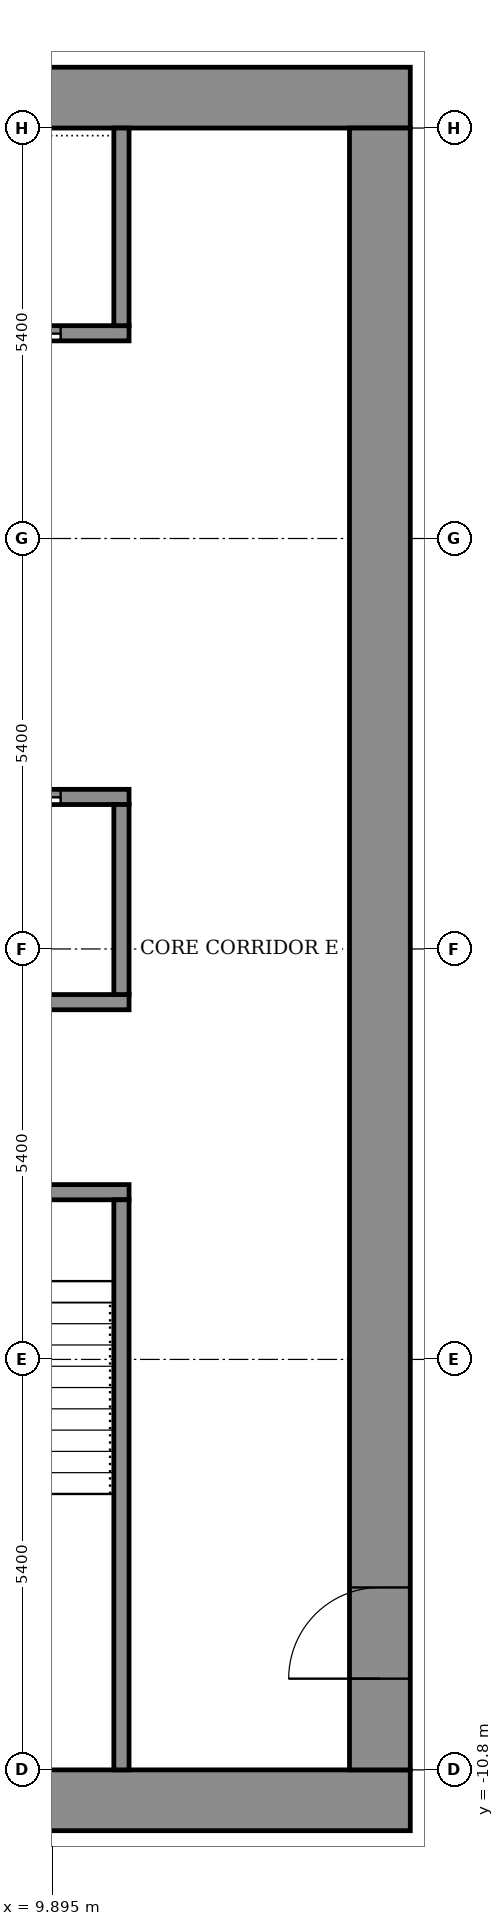
"""IFC4 building model, lengths in metres.
Left out: names, types, materials, properties, quantities, classifications, styles, units other than length and angle.
Written with IfcOpenShell. Run it as: python <this file> out.ifc"""

import sys

from ifc_helpers import new_model, si_unit, direction, frame, frame_2d, origin, place, context, subcontext, project, spatial, rectangle, extrude, element, fill, save


model = new_model("IFC4")
c1 = context("Model", 3, precision=1e-05, world=origin(), true_north=direction((0.0, 1.0)))
c2 = subcontext(c1, "Body", "Model", "MODEL_VIEW")
j1 = project(units=[si_unit("LENGTHUNIT", "METRE"), si_unit("PLANEANGLEUNIT", "RADIAN")], contexts=[c1])
p1 = place(None, origin())
s1 = spatial("IfcSite", under=j1, at=p1, CompositionType="ELEMENT")
p2 = place(p1, origin())
s2 = spatial("IfcBuilding", under=s1, at=p2, CompositionType="ELEMENT")
p3 = place(p2, frame((0.0, 0.0, 197.9)))
s3 = spatial("IfcBuildingStorey", under=s2, at=p3, CompositionType="ELEMENT", Elevation=197.9)
for number, where, z_axis, x_axis in (
    (1, (-14.6, -11.2, 0.0), (0.0, 0.0, 1.0), (1.0, 0.0, 0.0)),
    (2, (-14.6, 11.2, 0.0), (0.0, 0.0, 1.0), (1.0, 0.0, 0.0)),
):
    element("IfcWall", number, at=place(p3, frame(where, z_axis=z_axis, x_axis=x_axis)), inside=s3, PredefinedType="SHEAR", context=c2, shape_type="SweptSolid", body=[
        extrude(rectangle(XDim=29.2, YDim=0.8, at=frame_2d((14.6, 0.0))), origin(), (0.0, 0.0, 1.0), 3.6),
    ])
p4 = place(p3, frame((14.2, -10.8, 0.0), z_axis=(0.0, 0.0, 1.0), x_axis=(0.0, 1.0, 0.0)))
e3 = element("IfcWall", 3, at=p4, inside=s3, PredefinedType="SHEAR", context=c2, shape_type="SweptSolid", body=[
    extrude(rectangle(XDim=21.6, YDim=0.8, at=frame_2d((10.8, 0.0))), origin(), (0.0, 0.0, 1.0), 3.6),
])
p5 = place(p4, frame((1.2, 0.0, 0.0)))
e4 = element("IfcOpeningElement", 4, at=p5, cuts=e3, PredefinedType="OPENING", context=c2, shape_type="SweptSolid", body=[
    extrude(rectangle(XDim=1.2, YDim=2.1, at=frame_2d((0.6, 1.05))), frame((0.0, 0.41, 0.0), z_axis=(0.0, -1.0, 0.0), x_axis=(1.0, 0.0, 0.0)), (0.0, 0.0, 1.0), 0.82),
])
p6 = place(p3, frame((-10.9, -3.2, 0.0), z_axis=(0.0, 0.0, 1.0), x_axis=(1.0, 0.0, 0.0)))
e5 = element("IfcWall", 5, at=p6, inside=s3, PredefinedType="SHEAR", context=c2, shape_type="SweptSolid", body=[
    extrude(rectangle(XDim=21.8, YDim=0.2, at=frame_2d((10.9, 0.0))), origin(), (0.0, 0.0, 1.0), 3.05),
])
p7 = place(p6, frame((1.075, 0.0, 0.0)))
e6 = element("IfcOpeningElement", 6, at=p7, cuts=e5, PredefinedType="OPENING", context=c2, shape_type="SweptSolid", body=[
    extrude(rectangle(XDim=1.1, YDim=2.1, at=frame_2d((0.55, 1.05))), frame((0.0, 0.11, 0.0), z_axis=(0.0, -1.0, 0.0), x_axis=(1.0, 0.0, 0.0)), (0.0, 0.0, 1.0), 0.22),
])
p8 = place(p6, frame((10.325, 0.0, 0.0)))
e7 = element("IfcOpeningElement", 7, at=p8, cuts=e5, PredefinedType="OPENING", context=c2, shape_type="SweptSolid", body=[
    extrude(rectangle(XDim=1.1, YDim=2.1, at=frame_2d((0.55, 1.05))), frame((0.0, 0.11, 0.0), z_axis=(0.0, -1.0, 0.0), x_axis=(1.0, 0.0, 0.0)), (0.0, 0.0, 1.0), 0.22),
])
p9 = place(p6, frame((19.625, 0.0, 0.0)))
e8 = element("IfcOpeningElement", 8, at=p9, cuts=e5, PredefinedType="OPENING", context=c2, shape_type="SweptSolid", body=[
    extrude(rectangle(XDim=1.1, YDim=2.1, at=frame_2d((0.55, 1.05))), frame((0.0, 0.11, 0.0), z_axis=(0.0, -1.0, 0.0), x_axis=(1.0, 0.0, 0.0)), (0.0, 0.0, 1.0), 0.22),
])
p10 = place(p6, frame((5.7, 0.0, 0.0)))
e9 = element("IfcOpeningElement", 9, at=p10, cuts=e5, PredefinedType="OPENING", context=c2, shape_type="SweptSolid", body=[
    extrude(rectangle(XDim=1.1, YDim=2.1, at=frame_2d((0.55, 1.05))), frame((0.0, 0.11, 0.0), z_axis=(0.0, -1.0, 0.0), x_axis=(1.0, 0.0, 0.0)), (0.0, 0.0, 1.0), 0.22),
])
p11 = place(p6, frame((14.975, 0.0, 0.0)))
e10 = element("IfcOpeningElement", 10, at=p11, cuts=e5, PredefinedType="OPENING", context=c2, shape_type="SweptSolid", body=[
    extrude(rectangle(XDim=1.1, YDim=2.1, at=frame_2d((0.55, 1.05))), frame((0.0, 0.11, 0.0), z_axis=(0.0, -1.0, 0.0), x_axis=(1.0, 0.0, 0.0)), (0.0, 0.0, 1.0), 0.22),
])
p12 = place(p3, frame((-10.9, -0.7, 0.0), z_axis=(0.0, 0.0, 1.0), x_axis=(1.0, 0.0, 0.0)))
e11 = element("IfcWall", 11, at=p12, inside=s3, PredefinedType="SHEAR", context=c2, shape_type="SweptSolid", body=[
    extrude(rectangle(XDim=21.8, YDim=0.2, at=frame_2d((10.9, 0.0))), origin(), (0.0, 0.0, 1.0), 3.05),
])
p13 = place(p3, frame((-10.9, 2.0, 0.0), z_axis=(0.0, 0.0, 1.0), x_axis=(1.0, 0.0, 0.0)))
e12 = element("IfcWall", 12, at=p13, inside=s3, PredefinedType="SHEAR", context=c2, shape_type="SweptSolid", body=[
    extrude(rectangle(XDim=21.8, YDim=0.2, at=frame_2d((10.9, 0.0))), origin(), (0.0, 0.0, 1.0), 3.05),
])
p14 = place(p13, frame((14.4, 0.0, 0.0)))
e13 = element("IfcOpeningElement", 13, at=p14, cuts=e12, PredefinedType="OPENING", context=c2, shape_type="SweptSolid", body=[
    extrude(rectangle(XDim=1.1, YDim=2.1, at=frame_2d((0.55, 1.05))), frame((0.0, 0.11, 0.0), z_axis=(0.0, -1.0, 0.0), x_axis=(1.0, 0.0, 0.0)), (0.0, 0.0, 1.0), 0.22),
])
p15 = place(p13, frame((17.1, 0.0, 0.0)))
e14 = element("IfcOpeningElement", 14, at=p15, cuts=e12, PredefinedType="OPENING", context=c2, shape_type="SweptSolid", body=[
    extrude(rectangle(XDim=1.1, YDim=2.1, at=frame_2d((0.55, 1.05))), frame((0.0, 0.11, 0.0), z_axis=(0.0, -1.0, 0.0), x_axis=(1.0, 0.0, 0.0)), (0.0, 0.0, 1.0), 0.22),
])
p16 = place(p13, frame((19.8, 0.0, 0.0)))
e15 = element("IfcOpeningElement", 15, at=p16, cuts=e12, PredefinedType="OPENING", context=c2, shape_type="SweptSolid", body=[
    extrude(rectangle(XDim=1.1, YDim=2.1, at=frame_2d((0.55, 1.05))), frame((0.0, 0.11, 0.0), z_axis=(0.0, -1.0, 0.0), x_axis=(1.0, 0.0, 0.0)), (0.0, 0.0, 1.0), 0.22),
])
p17 = place(p13, frame((1.675, 0.0, 0.0)))
e16 = element("IfcOpeningElement", 16, at=p17, cuts=e12, PredefinedType="OPENING", context=c2, shape_type="SweptSolid", body=[
    extrude(rectangle(XDim=0.9, YDim=2.1, at=frame_2d((0.45, 1.05))), frame((0.0, 0.11, 0.0), z_axis=(0.0, -1.0, 0.0), x_axis=(1.0, 0.0, 0.0)), (0.0, 0.0, 1.0), 0.22),
])
p18 = place(p13, frame((8.425, 0.0, 0.0)))
e17 = element("IfcOpeningElement", 17, at=p18, cuts=e12, PredefinedType="OPENING", context=c2, shape_type="SweptSolid", body=[
    extrude(rectangle(XDim=0.9, YDim=2.1, at=frame_2d((0.45, 1.05))), frame((0.0, 0.11, 0.0), z_axis=(0.0, -1.0, 0.0), x_axis=(1.0, 0.0, 0.0)), (0.0, 0.0, 1.0), 0.22),
])
p19 = place(p3, frame((-10.9, 8.1, 0.0), z_axis=(0.0, 0.0, 1.0), x_axis=(1.0, 0.0, 0.0)))
e18 = element("IfcWall", 18, at=p19, inside=s3, PredefinedType="SHEAR", context=c2, shape_type="SweptSolid", body=[
    extrude(rectangle(XDim=21.8, YDim=0.2, at=frame_2d((10.9, 0.0))), origin(), (0.0, 0.0, 1.0), 3.05),
])
p20 = place(p19, frame((14.4, 0.0, 0.0)))
e19 = element("IfcOpeningElement", 19, at=p20, cuts=e18, PredefinedType="OPENING", context=c2, shape_type="SweptSolid", body=[
    extrude(rectangle(XDim=1.1, YDim=2.1, at=frame_2d((0.55, 1.05))), frame((0.0, 0.11, 0.0), z_axis=(0.0, -1.0, 0.0), x_axis=(1.0, 0.0, 0.0)), (0.0, 0.0, 1.0), 0.22),
])
p21 = place(p19, frame((17.1, 0.0, 0.0)))
e20 = element("IfcOpeningElement", 20, at=p21, cuts=e18, PredefinedType="OPENING", context=c2, shape_type="SweptSolid", body=[
    extrude(rectangle(XDim=1.1, YDim=2.1, at=frame_2d((0.55, 1.05))), frame((0.0, 0.11, 0.0), z_axis=(0.0, -1.0, 0.0), x_axis=(1.0, 0.0, 0.0)), (0.0, 0.0, 1.0), 0.22),
])
p22 = place(p19, frame((19.8, 0.0, 0.0)))
e21 = element("IfcOpeningElement", 21, at=p22, cuts=e18, PredefinedType="OPENING", context=c2, shape_type="SweptSolid", body=[
    extrude(rectangle(XDim=1.1, YDim=2.1, at=frame_2d((0.55, 1.05))), frame((0.0, 0.11, 0.0), z_axis=(0.0, -1.0, 0.0), x_axis=(1.0, 0.0, 0.0)), (0.0, 0.0, 1.0), 0.22),
])
p23 = place(p19, frame((1.675, 0.0, 0.0)))
e22 = element("IfcOpeningElement", 22, at=p23, cuts=e18, PredefinedType="OPENING", context=c2, shape_type="SweptSolid", body=[
    extrude(rectangle(XDim=0.9, YDim=2.1, at=frame_2d((0.45, 1.05))), frame((0.0, 0.11, 0.0), z_axis=(0.0, -1.0, 0.0), x_axis=(1.0, 0.0, 0.0)), (0.0, 0.0, 1.0), 0.22),
])
p24 = place(p19, frame((8.425, 0.0, 0.0)))
e23 = element("IfcOpeningElement", 23, at=p24, cuts=e18, PredefinedType="OPENING", context=c2, shape_type="SweptSolid", body=[
    extrude(rectangle(XDim=0.9, YDim=2.1, at=frame_2d((0.45, 1.05))), frame((0.0, 0.11, 0.0), z_axis=(0.0, -1.0, 0.0), x_axis=(1.0, 0.0, 0.0)), (0.0, 0.0, 1.0), 0.22),
])
p25 = place(p3, frame((10.8, -10.8, 0.0), z_axis=(0.0, 0.0, 1.0), x_axis=(0.0, 1.0, 0.0)))
e24 = element("IfcWall", 24, at=p25, inside=s3, PredefinedType="SHEAR", context=c2, shape_type="SweptSolid", body=[
    extrude(rectangle(XDim=7.5, YDim=0.2, at=frame_2d((3.75, 0.0))), origin(), (0.0, 0.0, 1.0), 3.05),
])
p26 = place(p3, frame((10.8, -0.6, 0.0), z_axis=(0.0, 0.0, 1.0), x_axis=(0.0, 1.0, 0.0)))
e25 = element("IfcWall", 25, at=p26, inside=s3, PredefinedType="SHEAR", context=c2, shape_type="SweptSolid", body=[
    extrude(rectangle(XDim=2.5, YDim=0.2, at=frame_2d((1.25, 0.0))), origin(), (0.0, 0.0, 1.0), 3.05),
])
p27 = place(p3, frame((10.8, 8.2, 0.0), z_axis=(0.0, 0.0, 1.0), x_axis=(0.0, 1.0, 0.0)))
e26 = element("IfcWall", 26, at=p27, inside=s3, PredefinedType="SHEAR", context=c2, shape_type="SweptSolid", body=[
    extrude(rectangle(XDim=2.6, YDim=0.2, at=frame_2d((1.3, 0.0))), origin(), (0.0, 0.0, 1.0), 3.05),
])
p28 = place(p5, origin())
e27 = element("IfcDoor", 27, at=p28, inside=s3, OperationType="DOUBLE_DOOR_SINGLE_SWING", PredefinedType="DOOR", context=c2, shape_type="SweptSolid", body=[
    extrude(rectangle(XDim=1.2, YDim=2.1, at=frame_2d((0.6, 1.05))), frame((0.0, 0.025, 0.0), z_axis=(0.0, -1.0, 0.0), x_axis=(1.0, 0.0, 0.0)), (0.0, 0.0, 1.0), 0.05),
])
fill(e4, e27)
p29 = place(p16, origin())
e28 = element("IfcDoor", 28, at=p29, inside=s3, OperationType="SLIDING_TO_LEFT", PredefinedType="DOOR", context=c2, shape_type="SweptSolid", body=[
    extrude(rectangle(XDim=1.1, YDim=2.1, at=frame_2d((0.55, 1.05))), frame((0.0, 0.025, 0.0), z_axis=(0.0, -1.0, 0.0), x_axis=(1.0, 0.0, 0.0)), (0.0, 0.0, 1.0), 0.05),
])
fill(e15, e28)
p30 = place(p22, origin())
e29 = element("IfcDoor", 29, at=p30, inside=s3, OperationType="SLIDING_TO_LEFT", PredefinedType="DOOR", context=c2, shape_type="SweptSolid", body=[
    extrude(rectangle(XDim=1.1, YDim=2.1, at=frame_2d((0.55, 1.05))), frame((0.0, 0.025, 0.0), z_axis=(0.0, -1.0, 0.0), x_axis=(1.0, 0.0, 0.0)), (0.0, 0.0, 1.0), 0.05),
])
fill(e21, e29)
save(model, sys.argv[1])
